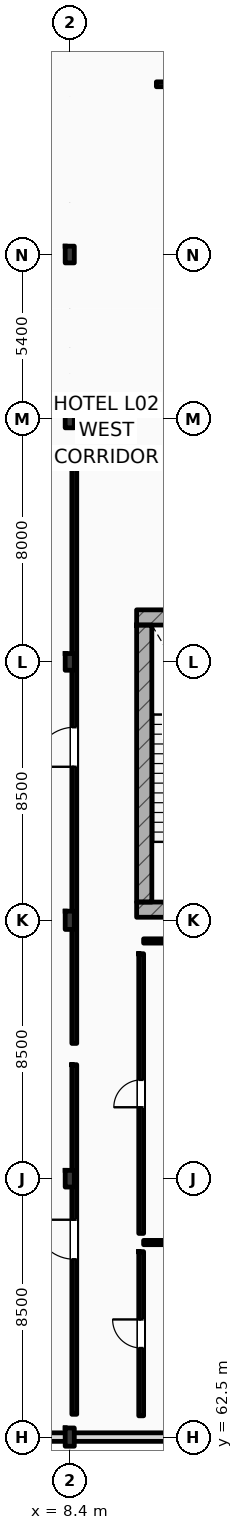
"""IFC4 building model, lengths in metres.
Left out: names, types, materials, properties, quantities, classifications, styles, units other than length and angle.
Written with IfcOpenShell. Run it as: python <this file> out.ifc"""

import sys

from ifc_helpers import new_model, si_unit, direction, frame, frame_2d, origin, origin_2d, place, context, subcontext, project, spatial, rectangle, i_section, extrude, element, fill, save


model = new_model("IFC4")
c1 = context("Model", 3, precision=1e-05, world=origin(), true_north=direction((0.0, 1.0)))
c2 = subcontext(c1, "Body", "Model", "MODEL_VIEW")
j1 = project(units=[si_unit("LENGTHUNIT", "METRE"), si_unit("PLANEANGLEUNIT", "RADIAN")], contexts=[c1])
p1 = place(None, origin())
s1 = spatial("IfcSite", under=j1, at=p1, CompositionType="ELEMENT")
p2 = place(p1, origin())
s2 = spatial("IfcBuilding", under=s1, at=p2, CompositionType="ELEMENT")
p3 = place(p2, frame((0.0, 0.0, 11.4)))
s3 = spatial("IfcBuildingStorey", under=s2, at=p3, CompositionType="ELEMENT", Elevation=11.4)
p4 = place(p3, frame((8.4, 62.5, 0.0), z_axis=(0.0, 0.0, 1.0), x_axis=(1.0, 0.0, 0.0)))
e1 = element("IfcColumn", 1, at=p4, inside=s3, PredefinedType="COLUMN", context=c2, shape_type="SweptSolid", body=[
    extrude(i_section(OverallWidth=0.3, OverallDepth=0.6, WebThickness=0.015, FlangeThickness=0.03, FilletRadius=0.027, at=origin_2d()), origin(), (0.0, 0.0, 1.0), 4.8),
])
p5 = place(p3, frame((8.4, 71.0, 0.0), z_axis=(0.0, 0.0, 1.0), x_axis=(1.0, 0.0, 0.0)))
e2 = element("IfcColumn", 2, at=p5, inside=s3, PredefinedType="COLUMN", context=c2, shape_type="SweptSolid", body=[
    extrude(i_section(OverallWidth=0.3, OverallDepth=0.55, WebThickness=0.015, FlangeThickness=0.029, FilletRadius=0.027, at=origin_2d()), origin(), (0.0, 0.0, 1.0), 4.8),
])
p6 = place(p3, frame((8.4, 79.5, 0.0), z_axis=(0.0, 0.0, 1.0), x_axis=(1.0, 0.0, 0.0)))
e3 = element("IfcColumn", 3, at=p6, inside=s3, PredefinedType="COLUMN", context=c2, shape_type="SweptSolid", body=[
    extrude(i_section(OverallWidth=0.3, OverallDepth=0.6, WebThickness=0.015, FlangeThickness=0.03, FilletRadius=0.027, at=origin_2d()), origin(), (0.0, 0.0, 1.0), 4.8),
])
p7 = place(p3, frame((8.4, 88.0, 0.0), z_axis=(0.0, 0.0, 1.0), x_axis=(1.0, 0.0, 0.0)))
e4 = element("IfcColumn", 4, at=p7, inside=s3, PredefinedType="COLUMN", context=c2, shape_type="SweptSolid", body=[
    extrude(i_section(OverallWidth=0.3, OverallDepth=0.55, WebThickness=0.015, FlangeThickness=0.029, FilletRadius=0.027, at=origin_2d()), origin(), (0.0, 0.0, 1.0), 4.8),
])
p8 = place(p3, frame((8.4, 96.0, 0.0), z_axis=(0.0, 0.0, 1.0), x_axis=(1.0, 0.0, 0.0)))
e5 = element("IfcColumn", 5, at=p8, inside=s3, PredefinedType="COLUMN", context=c2, shape_type="SweptSolid", body=[
    extrude(i_section(OverallWidth=0.3, OverallDepth=0.6, WebThickness=0.015, FlangeThickness=0.03, FilletRadius=0.027, at=origin_2d()), origin(), (0.0, 0.0, 1.0), 4.8),
])
p9 = place(p3, frame((8.4, 101.4, 0.0), z_axis=(0.0, 0.0, 1.0), x_axis=(1.0, 0.0, 0.0)))
e6 = element("IfcColumn", 6, at=p9, inside=s3, PredefinedType="COLUMN", context=c2, shape_type="SweptSolid", body=[
    extrude(i_section(OverallWidth=0.3, OverallDepth=0.55, WebThickness=0.015, FlangeThickness=0.029, FilletRadius=0.027, at=origin_2d()), origin(), (0.0, 0.0, 1.0), 4.8),
])
for number, where, z_axis, x_axis in (
    (7, (10.6, 89.462, 0.0), (0.0, 0.0, 1.0), (1.0, 0.0, 0.0)),
    (8, (10.6, 79.85, 0.0), (0.0, 0.0, 1.0), (1.0, 0.0, 0.0)),
):
    element("IfcWall", number, at=place(p3, frame(where, z_axis=z_axis, x_axis=x_axis)), inside=s3, PredefinedType="SHEAR", context=c2, shape_type="SweptSolid", body=[
        extrude(rectangle(XDim=5.16, YDim=0.5, at=frame_2d((2.58, 0.0))), origin(), (0.0, 0.0, 1.0), 4.8),
    ])
p10 = place(p3, frame((10.85, 80.1, 0.0), z_axis=(0.0, 0.0, 1.0), x_axis=(0.0, 1.0, 0.0)))
e9 = element("IfcWall", 9, at=p10, inside=s3, PredefinedType="SHEAR", context=c2, shape_type="SweptSolid", body=[
    extrude(rectangle(XDim=9.112, YDim=0.5, at=frame_2d((4.556, 0.0))), origin(), (0.0, 0.0, 1.0), 4.8),
])
p11 = place(p3, frame((0.0, 62.5, 0.0), z_axis=(0.0, 0.0, 1.0), x_axis=(1.0, 0.0, 0.0)))
e10 = element("IfcWall", 10, at=p11, inside=s3, PredefinedType="STANDARD", context=c2, shape_type="SweptSolid", body=[
    extrude(rectangle(XDim=25.2, YDim=0.28, at=frame_2d((12.6, 0.0))), origin(), (0.0, 0.0, 1.0), 3.96),
])
p12 = place(p3, frame((11.25, 107.0, 0.0), z_axis=(0.0, 0.0, 1.0), x_axis=(1.0, 0.0, 0.0)))
e11 = element("IfcWall", 11, at=p12, inside=s3, PredefinedType="PARTITIONING", context=c2, shape_type="SweptSolid", body=[
    extrude(rectangle(XDim=13.3, YDim=0.16, at=frame_2d((6.65, 0.0))), origin(), (0.0, 0.0, 1.0), 4.52),
])
p13 = place(p12, frame((6.0, 0.0, 0.0)))
e12 = element("IfcOpeningElement", 12, at=p13, cuts=e11, PredefinedType="OPENING", context=c2, shape_type="SweptSolid", body=[
    extrude(rectangle(XDim=1.3, YDim=2.2, at=frame_2d((0.65, 1.1))), frame((0.0, 0.09, 0.0), z_axis=(0.0, -1.0, 0.0), x_axis=(1.0, 0.0, 0.0)), (0.0, 0.0, 1.0), 0.18),
])
p14 = place(p3, frame((8.55, 63.25, 0.0), z_axis=(0.0, 0.0, 1.0), x_axis=(0.0, 1.0, 0.0)))
e13 = element("IfcWall", 13, at=p14, inside=s3, PredefinedType="PARTITIONING", context=c2, shape_type="SweptSolid", body=[
    extrude(rectangle(XDim=11.5, YDim=0.16, at=frame_2d((5.75, 0.0))), origin(), (0.0, 0.0, 1.0), 4.11),
])
p15 = place(p14, frame((5.1, 0.0, 0.0)))
e14 = element("IfcOpeningElement", 14, at=p15, cuts=e13, PredefinedType="OPENING", context=c2, shape_type="SweptSolid", body=[
    extrude(rectangle(XDim=1.3, YDim=2.2, at=frame_2d((0.65, 1.1))), frame((0.0, 0.09, 0.0), z_axis=(0.0, -1.0, 0.0), x_axis=(1.0, 0.0, 0.0)), (0.0, 0.0, 1.0), 0.18),
])
p16 = place(p3, frame((8.55, 75.45, 0.0), z_axis=(0.0, 0.0, 1.0), x_axis=(0.0, 1.0, 0.0)))
e15 = element("IfcWall", 15, at=p16, inside=s3, PredefinedType="PARTITIONING", context=c2, shape_type="SweptSolid", body=[
    extrude(rectangle(XDim=19.5, YDim=0.16, at=frame_2d((9.75, 0.0))), origin(), (0.0, 0.0, 1.0), 4.11),
])
p17 = place(p16, frame((9.1, 0.0, 0.0)))
e16 = element("IfcOpeningElement", 16, at=p17, cuts=e15, PredefinedType="OPENING", context=c2, shape_type="SweptSolid", body=[
    extrude(rectangle(XDim=1.3, YDim=2.2, at=frame_2d((0.65, 1.1))), frame((0.0, 0.09, 0.0), z_axis=(0.0, -1.0, 0.0), x_axis=(1.0, 0.0, 0.0)), (0.0, 0.0, 1.0), 0.18),
])
p18 = place(p3, frame((10.75, 63.2, 0.0), z_axis=(0.0, 0.0, 1.0), x_axis=(0.0, 1.0, 0.0)))
e17 = element("IfcWall", 17, at=p18, inside=s3, PredefinedType="PARTITIONING", context=c2, shape_type="SweptSolid", body=[
    extrude(rectangle(XDim=5.4, YDim=0.16, at=frame_2d((2.7, 0.0))), origin(), (0.0, 0.0, 1.0), 4.52),
])
p19 = place(p18, frame((2.23, 0.0, 0.0)))
e18 = element("IfcOpeningElement", 18, at=p19, cuts=e17, PredefinedType="OPENING", context=c2, shape_type="SweptSolid", body=[
    extrude(rectangle(XDim=0.94, YDim=2.15, at=frame_2d((0.47, 1.075))), frame((0.0, 0.09, 0.0), z_axis=(0.0, -1.0, 0.0), x_axis=(1.0, 0.0, 0.0)), (0.0, 0.0, 1.0), 0.18),
])
p20 = place(p3, frame((10.75, 69.2, 0.0), z_axis=(0.0, 0.0, 1.0), x_axis=(0.0, 1.0, 0.0)))
e19 = element("IfcWall", 19, at=p20, inside=s3, PredefinedType="PARTITIONING", context=c2, shape_type="SweptSolid", body=[
    extrude(rectangle(XDim=9.2, YDim=0.16, at=frame_2d((4.6, 0.0))), origin(), (0.0, 0.0, 1.0), 4.52),
])
p21 = place(p20, frame((4.15, 0.0, 0.0)))
e20 = element("IfcOpeningElement", 20, at=p21, cuts=e19, PredefinedType="OPENING", context=c2, shape_type="SweptSolid", body=[
    extrude(rectangle(XDim=0.9, YDim=2.1, at=frame_2d((0.45, 1.05))), frame((0.0, 0.09, 0.0), z_axis=(0.0, -1.0, 0.0), x_axis=(1.0, 0.0, 0.0)), (0.0, 0.0, 1.0), 0.18),
])
p22 = place(p3, frame((10.83, 68.9, 0.0), z_axis=(0.0, 0.0, 1.0), x_axis=(1.0, 0.0, 0.0)))
e21 = element("IfcWall", 21, at=p22, inside=s3, PredefinedType="PARTITIONING", context=c2, shape_type="SweptSolid", body=[
    extrude(rectangle(XDim=6.72, YDim=0.14, at=frame_2d((3.36, 0.0))), origin(), (0.0, 0.0, 1.0), 4.52),
])
p23 = place(p3, frame((10.83, 78.82, 0.0), z_axis=(0.0, 0.0, 1.0), x_axis=(1.0, 0.0, 0.0)))
e22 = element("IfcWall", 22, at=p23, inside=s3, PredefinedType="PARTITIONING", context=c2, shape_type="SweptSolid", body=[
    extrude(rectangle(XDim=6.86, YDim=0.14, at=frame_2d((3.43, 0.0))), origin(), (0.0, 0.0, 1.0), 4.52),
])
p24 = place(p15, origin())
e23 = element("IfcDoor", 23, at=p24, inside=s3, OperationType="SINGLE_SWING_RIGHT", PredefinedType="DOOR", context=c2, shape_type="SweptSolid", body=[
    extrude(rectangle(XDim=1.3, YDim=2.2, at=frame_2d((0.65, 1.1))), frame((0.0, 0.025, 0.0), z_axis=(0.0, -1.0, 0.0), x_axis=(1.0, 0.0, 0.0)), (0.0, 0.0, 1.0), 0.05),
])
fill(e14, e23)
p25 = place(p17, origin())
e24 = element("IfcDoor", 24, at=p25, inside=s3, OperationType="SINGLE_SWING_LEFT", PredefinedType="DOOR", context=c2, shape_type="SweptSolid", body=[
    extrude(rectangle(XDim=1.3, YDim=2.2, at=frame_2d((0.65, 1.1))), frame((0.0, 0.025, 0.0), z_axis=(0.0, -1.0, 0.0), x_axis=(1.0, 0.0, 0.0)), (0.0, 0.0, 1.0), 0.05),
])
fill(e16, e24)
p26 = place(p19, origin())
e25 = element("IfcDoor", 25, at=p26, inside=s3, OperationType="SINGLE_SWING_RIGHT", PredefinedType="DOOR", context=c2, shape_type="SweptSolid", body=[
    extrude(rectangle(XDim=0.94, YDim=2.15, at=frame_2d((0.47, 1.075))), frame((0.0, 0.025, 0.0), z_axis=(0.0, -1.0, 0.0), x_axis=(1.0, 0.0, 0.0)), (0.0, 0.0, 1.0), 0.05),
])
fill(e18, e25)
p27 = place(p21, origin())
e26 = element("IfcDoor", 26, at=p27, inside=s3, OperationType="SINGLE_SWING_LEFT", PredefinedType="DOOR", context=c2, shape_type="SweptSolid", body=[
    extrude(rectangle(XDim=0.9, YDim=2.1, at=frame_2d((0.45, 1.05))), frame((0.0, 0.025, 0.0), z_axis=(0.0, -1.0, 0.0), x_axis=(1.0, 0.0, 0.0)), (0.0, 0.0, 1.0), 0.05),
])
fill(e20, e26)
save(model, sys.argv[1])
